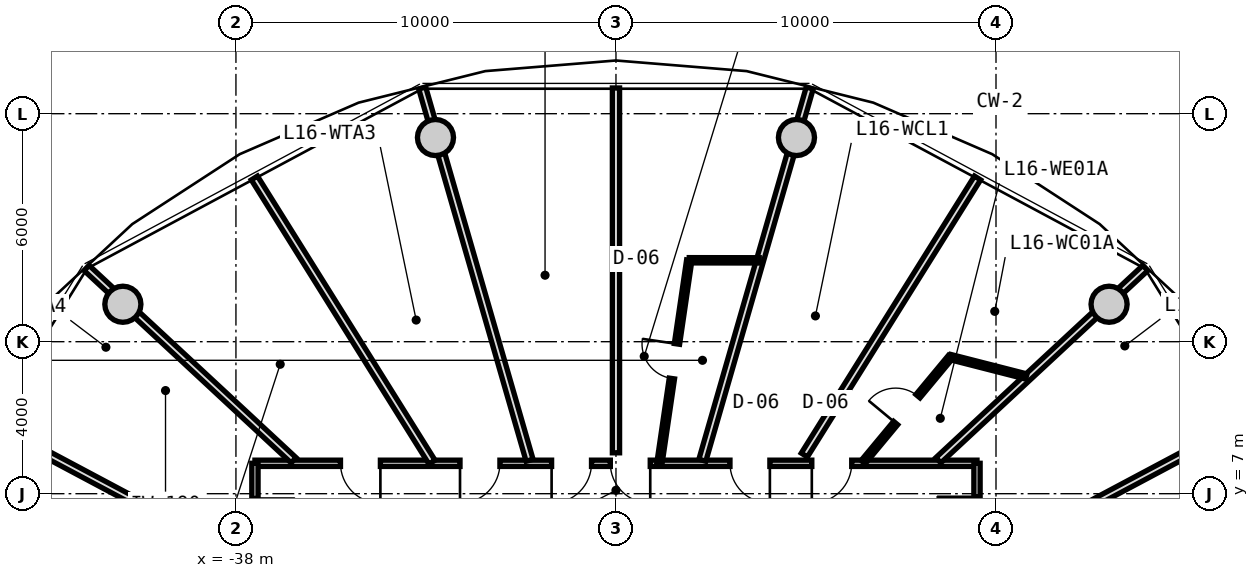
"""IFC4 building model, lengths in metres.
Left out: names, types, materials, properties, quantities, classifications, styles, units other than length and angle.
Written with IfcOpenShell. Run it as: python <this file> out.ifc"""

import sys

from ifc_helpers import new_model, si_unit, direction, frame, frame_2d, origin, origin_2d, place, context, subcontext, project, spatial, rectangle, circle, extrude, source, transform, mapped, element, fill, save


model = new_model("IFC4")
c1 = context("Model", 3, precision=1e-05, world=origin(), true_north=direction((0.0, 1.0)))
c2 = subcontext(c1, "Body", "Model", "MODEL_VIEW")
j1 = project(units=[si_unit("LENGTHUNIT", "METRE"), si_unit("PLANEANGLEUNIT", "RADIAN")], contexts=[c1])
p1 = place(None, origin())
s1 = spatial("IfcSite", under=j1, at=p1, CompositionType="ELEMENT")
p2 = place(p1, origin())
s2 = spatial("IfcBuilding", under=s1, at=p2, CompositionType="ELEMENT")
p3 = place(p2, frame((0.0, 0.0, 55.15)))
s3 = spatial("IfcBuildingStorey", under=s2, at=p3, CompositionType="ELEMENT", Elevation=55.15)
m1 = source(origin(), c2, "Body", "SweptSolid", [
    extrude(circle(Radius=0.475, at=origin_2d()), origin(), (0.0, 0.0, 1.0), 3.05),
])
for number, where, z_axis, x_axis in (
    (1, (-15.025, 11.985, 0.0), (0.0, 0.0, 1.0), (1.0, 0.0, 0.0)),
    (2, (-23.251, 16.373, 0.0), (0.0, 0.0, 1.0), (1.0, 0.0, 0.0)),
    (3, (-32.749, 16.373, 0.0), (0.0, 0.0, 1.0), (1.0, 0.0, 0.0)),
    (4, (-40.975, 11.985, 0.0), (0.0, 0.0, 1.0), (1.0, 0.0, 0.0)),
):
    element("IfcColumn", number, at=place(p3, frame(where, z_axis=z_axis, x_axis=x_axis)), inside=s3, PredefinedType="COLUMN", context=c2, shape_type="MappedRepresentation", body=[
        mapped(m1, transform((0.0, 0.0, 0.0), x_axis=(1.0, 0.0, 0.0), y_axis=(0.0, 1.0, 0.0), z_axis=(0.0, 0.0, 1.0), scale=1.0)),
    ])
m2 = source(origin(), c2, "Body", "SweptSolid", [
    extrude(rectangle(XDim=19.0, YDim=0.165, at=frame_2d((9.5, 0.0))), origin(), (0.0, 0.0, 1.0), 2.775),
])
p4 = place(p3, frame((-37.5, 7.8, 0.0), z_axis=(0.0, 0.0, 1.0), x_axis=(1.0, 0.0, 0.0)))
e5 = element("IfcWall", 5, at=p4, inside=s3, PredefinedType="PARTITIONING", context=c2, shape_type="MappedRepresentation", body=[
    mapped(m2, transform((0.0, 0.0, 0.0), x_axis=(1.0, 0.0, 0.0), y_axis=(0.0, 1.0, 0.0), z_axis=(0.0, 0.0, 1.0), scale=1.0)),
])
p5 = place(p4, frame((14.653, 0.0, 0.0)))
e6 = element("IfcOpeningElement", 6, at=p5, cuts=e5, PredefinedType="OPENING", context=c2, shape_type="SweptSolid", body=[
    extrude(rectangle(XDim=1.05, YDim=2.15, at=frame_2d((0.525, 1.075))), frame((0.0, 0.093, 0.0), z_axis=(0.0, -1.0, 0.0), x_axis=(1.0, 0.0, 0.0)), (0.0, 0.0, 1.0), 0.185),
])
p6 = place(p4, frame((12.5, 0.0, 0.0)))
e7 = element("IfcOpeningElement", 7, at=p6, cuts=e5, PredefinedType="OPENING", context=c2, shape_type="SweptSolid", body=[
    extrude(rectangle(XDim=1.05, YDim=2.15, at=frame_2d((0.525, 1.075))), frame((0.0, 0.093, 0.0), z_axis=(0.0, -1.0, 0.0), x_axis=(1.0, 0.0, 0.0)), (0.0, 0.0, 1.0), 0.185),
])
p7 = place(p4, frame((9.352, 0.0, 0.0)))
e8 = element("IfcOpeningElement", 8, at=p7, cuts=e5, PredefinedType="OPENING", context=c2, shape_type="SweptSolid", body=[
    extrude(rectangle(XDim=1.05, YDim=2.15, at=frame_2d((0.525, 1.075))), frame((0.0, 0.093, 0.0), z_axis=(0.0, -1.0, 0.0), x_axis=(1.0, 0.0, 0.0)), (0.0, 0.0, 1.0), 0.185),
])
p8 = place(p4, frame((7.806, 0.0, 0.0)))
e9 = element("IfcOpeningElement", 9, at=p8, cuts=e5, PredefinedType="OPENING", context=c2, shape_type="SweptSolid", body=[
    extrude(rectangle(XDim=1.05, YDim=2.15, at=frame_2d((0.525, 1.075))), frame((0.0, 0.093, 0.0), z_axis=(0.0, -1.0, 0.0), x_axis=(1.0, 0.0, 0.0)), (0.0, 0.0, 1.0), 0.185),
])
p9 = place(p4, frame((5.396, 0.0, 0.0)))
e10 = element("IfcOpeningElement", 10, at=p9, cuts=e5, PredefinedType="OPENING", context=c2, shape_type="SweptSolid", body=[
    extrude(rectangle(XDim=1.05, YDim=2.15, at=frame_2d((0.525, 1.075))), frame((0.0, 0.093, 0.0), z_axis=(0.0, -1.0, 0.0), x_axis=(1.0, 0.0, 0.0)), (0.0, 0.0, 1.0), 0.185),
])
p10 = place(p4, frame((2.251, 0.0, 0.0)))
e11 = element("IfcOpeningElement", 11, at=p10, cuts=e5, PredefinedType="OPENING", context=c2, shape_type="SweptSolid", body=[
    extrude(rectangle(XDim=1.05, YDim=2.15, at=frame_2d((0.525, 1.075))), frame((0.0, 0.093, 0.0), z_axis=(0.0, -1.0, 0.0), x_axis=(1.0, 0.0, 0.0)), (0.0, 0.0, 1.0), 0.185),
])
m3 = source(origin(), c2, "Body", "SweptSolid", [
    extrude(rectangle(XDim=15.6, YDim=0.165, at=frame_2d((7.8, 0.0))), origin(), (0.0, 0.0, 1.0), 2.775),
])
p11 = place(p3, frame((-37.5, -7.8, 0.0), z_axis=(0.0, 0.0, 1.0), x_axis=(0.0, 1.0, 0.0)))
e12 = element("IfcWall", 12, at=p11, inside=s3, PredefinedType="PARTITIONING", context=c2, shape_type="MappedRepresentation", body=[
    mapped(m3, transform((0.0, 0.0, 0.0), x_axis=(1.0, 0.0, 0.0), y_axis=(0.0, 1.0, 0.0), z_axis=(0.0, 0.0, 1.0), scale=1.0)),
])
p12 = place(p11, frame((13.623, 0.0, 0.0)))
e13 = element("IfcOpeningElement", 13, at=p12, cuts=e12, PredefinedType="OPENING", context=c2, shape_type="SweptSolid", body=[
    extrude(rectangle(XDim=1.05, YDim=2.15, at=frame_2d((0.525, 1.075))), frame((0.0, 0.093, 0.0), z_axis=(0.0, -1.0, 0.0), x_axis=(1.0, 0.0, 0.0)), (0.0, 0.0, 1.0), 0.185),
])
p13 = place(p11, frame((11.018, 0.0, 0.0)))
e14 = element("IfcOpeningElement", 14, at=p13, cuts=e12, PredefinedType="OPENING", context=c2, shape_type="SweptSolid", body=[
    extrude(rectangle(XDim=1.05, YDim=2.15, at=frame_2d((0.525, 1.075))), frame((0.0, 0.093, 0.0), z_axis=(0.0, -1.0, 0.0), x_axis=(1.0, 0.0, 0.0)), (0.0, 0.0, 1.0), 0.185),
])
p14 = place(p11, frame((8.467, 0.0, 0.0)))
e15 = element("IfcOpeningElement", 15, at=p14, cuts=e12, PredefinedType="OPENING", context=c2, shape_type="SweptSolid", body=[
    extrude(rectangle(XDim=1.05, YDim=2.15, at=frame_2d((0.525, 1.075))), frame((0.0, 0.093, 0.0), z_axis=(0.0, -1.0, 0.0), x_axis=(1.0, 0.0, 0.0)), (0.0, 0.0, 1.0), 0.185),
])
p15 = place(p11, frame((6.035, 0.0, 0.0)))
e16 = element("IfcOpeningElement", 16, at=p15, cuts=e12, PredefinedType="OPENING", context=c2, shape_type="SweptSolid", body=[
    extrude(rectangle(XDim=1.05, YDim=2.15, at=frame_2d((0.525, 1.075))), frame((0.0, 0.093, 0.0), z_axis=(0.0, -1.0, 0.0), x_axis=(1.0, 0.0, 0.0)), (0.0, 0.0, 1.0), 0.185),
])
p16 = place(p11, frame((3.489, 0.0, 0.0)))
e17 = element("IfcOpeningElement", 17, at=p16, cuts=e12, PredefinedType="OPENING", context=c2, shape_type="SweptSolid", body=[
    extrude(rectangle(XDim=1.05, YDim=2.15, at=frame_2d((0.525, 1.075))), frame((0.0, 0.093, 0.0), z_axis=(0.0, -1.0, 0.0), x_axis=(1.0, 0.0, 0.0)), (0.0, 0.0, 1.0), 0.185),
])
p17 = place(p11, frame((0.882, 0.0, 0.0)))
e18 = element("IfcOpeningElement", 18, at=p17, cuts=e12, PredefinedType="OPENING", context=c2, shape_type="SweptSolid", body=[
    extrude(rectangle(XDim=1.05, YDim=2.15, at=frame_2d((0.525, 1.075))), frame((0.0, 0.093, 0.0), z_axis=(0.0, -1.0, 0.0), x_axis=(1.0, 0.0, 0.0)), (0.0, 0.0, 1.0), 0.185),
])
p18 = place(p3, frame((-18.5, 7.8, 0.0), z_axis=(0.0, 0.0, 1.0), x_axis=(0.0, -1.0, 0.0)))
e19 = element("IfcWall", 19, at=p18, inside=s3, PredefinedType="PARTITIONING", context=c2, shape_type="MappedRepresentation", body=[
    mapped(m3, transform((0.0, 0.0, 0.0), x_axis=(1.0, 0.0, 0.0), y_axis=(0.0, 1.0, 0.0), z_axis=(0.0, 0.0, 1.0), scale=1.0)),
])
p19 = place(p18, frame((12.141, 0.0, 0.0)))
e20 = element("IfcOpeningElement", 20, at=p19, cuts=e19, PredefinedType="OPENING", context=c2, shape_type="SweptSolid", body=[
    extrude(rectangle(XDim=1.25, YDim=2.2, at=frame_2d((0.625, 1.1))), frame((0.0, 0.093, 0.0), z_axis=(0.0, -1.0, 0.0), x_axis=(1.0, 0.0, 0.0)), (0.0, 0.0, 1.0), 0.185),
])
p20 = place(p18, frame((7.175, 0.0, 0.0)))
e21 = element("IfcOpeningElement", 21, at=p20, cuts=e19, PredefinedType="OPENING", context=c2, shape_type="SweptSolid", body=[
    extrude(rectangle(XDim=1.25, YDim=2.2, at=frame_2d((0.625, 1.1))), frame((0.0, 0.093, 0.0), z_axis=(0.0, -1.0, 0.0), x_axis=(1.0, 0.0, 0.0)), (0.0, 0.0, 1.0), 0.185),
])
p21 = place(p18, frame((2.826, 0.0, 0.0)))
e22 = element("IfcOpeningElement", 22, at=p21, cuts=e19, PredefinedType="OPENING", context=c2, shape_type="SweptSolid", body=[
    extrude(rectangle(XDim=1.05, YDim=2.15, at=frame_2d((0.525, 1.075))), frame((0.0, 0.093, 0.0), z_axis=(0.0, -1.0, 0.0), x_axis=(1.0, 0.0, 0.0)), (0.0, 0.0, 1.0), 0.185),
])
p22 = place(p18, frame((0.881, 0.0, 0.0)))
e23 = element("IfcOpeningElement", 23, at=p22, cuts=e19, PredefinedType="OPENING", context=c2, shape_type="SweptSolid", body=[
    extrude(rectangle(XDim=1.05, YDim=2.15, at=frame_2d((0.525, 1.075))), frame((0.0, 0.093, 0.0), z_axis=(0.0, -1.0, 0.0), x_axis=(1.0, 0.0, 0.0)), (0.0, 0.0, 1.0), 0.185),
])
m4 = source(origin(), c2, "Body", "SweptSolid", [
    extrude(rectangle(XDim=7.435, YDim=0.19, at=frame_2d((3.717, 0.0))), origin(), (0.0, 0.0, 1.0), 2.225),
])
p23 = place(p3, frame((-36.483, 7.88, 0.0), z_axis=(0.0, 0.0, 1.0), x_axis=(-0.732651956848, 0.680603489652, 0.0)))
e24 = element("IfcWall", 24, at=p23, inside=s3, PredefinedType="PARTITIONING", context=c2, shape_type="MappedRepresentation", body=[
    mapped(m4, transform((0.0, 0.0, 0.0), x_axis=(1.0, 0.0, 0.0), y_axis=(0.0, 1.0, 0.0), z_axis=(0.0, 0.0, 1.0), scale=1.0)),
])
m5 = source(origin(), c2, "Body", "SweptSolid", [
    extrude(rectangle(XDim=7.873, YDim=0.19, at=frame_2d((3.937, 0.0))), origin(), (0.0, 0.0, 1.0), 2.775),
])
p24 = place(p3, frame((-37.53, 5.138, 0.0), z_axis=(0.0, 0.0, 1.0), x_axis=(-0.882666052726, 0.470000680175, 0.0)))
e25 = element("IfcWall", 25, at=p24, inside=s3, PredefinedType="PARTITIONING", context=c2, shape_type="MappedRepresentation", body=[
    mapped(m5, transform((0.0, 0.0, 0.0), x_axis=(1.0, 0.0, 0.0), y_axis=(0.0, 1.0, 0.0), z_axis=(0.0, 0.0, 1.0), scale=1.0)),
])
p25 = place(p3, frame((-19.517, 7.88, 0.0), z_axis=(0.0, 0.0, 1.0), x_axis=(0.732651956848, 0.680603489652, 0.0)))
e26 = element("IfcWall", 26, at=p25, inside=s3, PredefinedType="PARTITIONING", context=c2, shape_type="MappedRepresentation", body=[
    mapped(m4, transform((0.0, 0.0, 0.0), x_axis=(1.0, 0.0, 0.0), y_axis=(0.0, 1.0, 0.0), z_axis=(0.0, 0.0, 1.0), scale=1.0)),
])
m6 = source(origin(), c2, "Body", "SweptSolid", [
    extrude(rectangle(XDim=7.677, YDim=0.19, at=frame_2d((3.838, 0.0))), origin(), (0.0, 0.0, 1.0), 2.775),
])
p26 = place(p3, frame((-18.297, 5.231, 0.0), z_axis=(0.0, 0.0, 1.0), x_axis=(0.882725057546, 0.469889851753, 0.0)))
e27 = element("IfcWall", 27, at=p26, inside=s3, PredefinedType="PARTITIONING", context=c2, shape_type="MappedRepresentation", body=[
    mapped(m6, transform((0.0, 0.0, 0.0), x_axis=(1.0, 0.0, 0.0), y_axis=(0.0, 1.0, 0.0), z_axis=(0.0, 0.0, 1.0), scale=1.0)),
])
m7 = source(origin(), c2, "Body", "SweptSolid", [
    extrude(rectangle(XDim=10.196, YDim=0.19, at=frame_2d((5.098, 0.0))), origin(), (0.0, 0.0, 1.0), 2.225),
])
p27 = place(p3, frame((-25.727, 7.88, 0.0), z_axis=(0.0, 0.0, 1.0), x_axis=(0.277136420347, 0.960830580549, 0.0)))
e28 = element("IfcWall", 28, at=p27, inside=s3, PredefinedType="PARTITIONING", context=c2, shape_type="MappedRepresentation", body=[
    mapped(m7, transform((0.0, 0.0, 0.0), x_axis=(1.0, 0.0, 0.0), y_axis=(0.0, 1.0, 0.0), z_axis=(0.0, 0.0, 1.0), scale=1.0)),
])
m8 = source(origin(), c2, "Body", "SweptSolid", [
    extrude(rectangle(XDim=8.598, YDim=0.19, at=frame_2d((4.299, 0.0))), origin(), (0.0, 0.0, 1.0), 2.775),
])
p28 = place(p3, frame((-23.043, 8.017, 0.0), z_axis=(0.0, 0.0, 1.0), x_axis=(0.530039776395, 0.847972779893, 0.0)))
e29 = element("IfcWall", 29, at=p28, inside=s3, PredefinedType="PARTITIONING", context=c2, shape_type="MappedRepresentation", body=[
    mapped(m8, transform((0.0, 0.0, 0.0), x_axis=(1.0, 0.0, 0.0), y_axis=(0.0, 1.0, 0.0), z_axis=(0.0, 0.0, 1.0), scale=1.0)),
])
m9 = source(origin(), c2, "Body", "SweptSolid", [
    extrude(rectangle(XDim=3.594, YDim=0.14, at=frame_2d((1.797, 0.0))), origin(), (0.0, 0.0, 1.0), 2.775),
])
p29 = place(p3, frame((-21.496, 7.83, 0.0), z_axis=(0.0, 0.0, 1.0), x_axis=(0.639001147083, 0.769205781326, 0.0)))
e30 = element("IfcWall", 30, at=p29, inside=s3, PredefinedType="PARTITIONING", context=c2, shape_type="MappedRepresentation", body=[
    mapped(m9, transform((0.0, 0.0, 0.0), x_axis=(1.0, 0.0, 0.0), y_axis=(0.0, 1.0, 0.0), z_axis=(0.0, 0.0, 1.0), scale=1.0)),
])
p30 = place(p29, frame((1.337, 0.0, 0.0)))
e31 = element("IfcOpeningElement", 31, at=p30, cuts=e30, PredefinedType="OPENING", context=c2, shape_type="SweptSolid", body=[
    extrude(rectangle(XDim=0.92, YDim=2.1, at=frame_2d((0.46, 1.05))), frame((0.0, 0.08, 0.0), z_axis=(0.0, -1.0, 0.0), x_axis=(1.0, 0.0, 0.0)), (0.0, 0.0, 1.0), 0.16),
])
m10 = source(origin(), c2, "Body", "SweptSolid", [
    extrude(rectangle(XDim=2.062, YDim=0.14, at=frame_2d((1.031, 0.0))), origin(), (0.0, 0.0, 1.0), 2.415),
])
p31 = place(p3, frame((-19.199, 10.595, 0.0), z_axis=(0.0, 0.0, 1.0), x_axis=(0.968776253543, -0.247936626121, 0.0)))
e32 = element("IfcWall", 32, at=p31, inside=s3, PredefinedType="PARTITIONING", context=c2, shape_type="MappedRepresentation", body=[
    mapped(m10, transform((0.0, 0.0, 0.0), x_axis=(1.0, 0.0, 0.0), y_axis=(0.0, 1.0, 0.0), z_axis=(0.0, 0.0, 1.0), scale=1.0)),
])
p32 = place(p3, frame((-30.273, 7.88, 0.0), z_axis=(0.0, 0.0, 1.0), x_axis=(-0.277136420347, 0.960830580549, 0.0)))
e33 = element("IfcWall", 33, at=p32, inside=s3, PredefinedType="PARTITIONING", context=c2, shape_type="MappedRepresentation", body=[
    mapped(m7, transform((0.0, 0.0, 0.0), x_axis=(1.0, 0.0, 0.0), y_axis=(0.0, 1.0, 0.0), z_axis=(0.0, 0.0, 1.0), scale=1.0)),
])
m11 = source(origin(), c2, "Body", "SweptSolid", [
    extrude(rectangle(XDim=9.601, YDim=0.19, at=frame_2d((4.8, 0.0))), origin(), (0.0, 0.0, 1.0), 2.775),
])
p33 = place(p3, frame((-28.0, 8.076, 0.0), z_axis=(0.0, 0.0, 1.0), x_axis=(0.0, 1.0, 0.0)))
e34 = element("IfcWall", 34, at=p33, inside=s3, PredefinedType="PARTITIONING", context=c2, shape_type="MappedRepresentation", body=[
    mapped(m11, transform((0.0, 0.0, 0.0), x_axis=(1.0, 0.0, 0.0), y_axis=(0.0, 1.0, 0.0), z_axis=(0.0, 0.0, 1.0), scale=1.0)),
])
m12 = source(origin(), c2, "Body", "SweptSolid", [
    extrude(rectangle(XDim=5.37, YDim=0.14, at=frame_2d((2.685, 0.0))), origin(), (0.0, 0.0, 1.0), 2.775),
])
p34 = place(p3, frame((-26.851, 7.83, 0.0), z_axis=(0.0, 0.0, 1.0), x_axis=(0.145131397853, 0.989412389935, 0.0)))
e35 = element("IfcWall", 35, at=p34, inside=s3, PredefinedType="PARTITIONING", context=c2, shape_type="MappedRepresentation", body=[
    mapped(m12, transform((0.0, 0.0, 0.0), x_axis=(1.0, 0.0, 0.0), y_axis=(0.0, 1.0, 0.0), z_axis=(0.0, 0.0, 1.0), scale=1.0)),
])
p35 = place(p34, frame((2.225, 0.0, 0.0)))
e36 = element("IfcOpeningElement", 36, at=p35, cuts=e35, PredefinedType="OPENING", context=c2, shape_type="SweptSolid", body=[
    extrude(rectangle(XDim=0.92, YDim=2.1, at=frame_2d((0.46, 1.05))), frame((0.0, 0.08, 0.0), z_axis=(0.0, -1.0, 0.0), x_axis=(1.0, 0.0, 0.0)), (0.0, 0.0, 1.0), 0.16),
])
m13 = source(origin(), c2, "Body", "SweptSolid", [
    extrude(rectangle(XDim=1.843, YDim=0.14, at=frame_2d((0.921, 0.0))), origin(), (0.0, 0.0, 1.0), 2.775),
])
p36 = place(p3, frame((-26.072, 13.143, 0.0), z_axis=(0.0, 0.0, 1.0), x_axis=(0.999998937801, -0.001457531246, 0.0)))
e37 = element("IfcWall", 37, at=p36, inside=s3, PredefinedType="PARTITIONING", context=c2, shape_type="MappedRepresentation", body=[
    mapped(m13, transform((0.0, 0.0, 0.0), x_axis=(1.0, 0.0, 0.0), y_axis=(0.0, 1.0, 0.0), z_axis=(0.0, 0.0, 1.0), scale=1.0)),
])
m14 = source(origin(), c2, "Body", "SweptSolid", [
    extrude(rectangle(XDim=8.818, YDim=0.19, at=frame_2d((4.409, 0.0))), origin(), (0.0, 0.0, 1.0), 2.775),
])
p37 = place(p3, frame((-32.841, 7.83, 0.0), z_axis=(0.0, 0.0, 1.0), x_axis=(-0.529931746109, 0.848040296487, 0.0)))
e38 = element("IfcWall", 38, at=p37, inside=s3, PredefinedType="PARTITIONING", context=c2, shape_type="MappedRepresentation", body=[
    mapped(m14, transform((0.0, 0.0, 0.0), x_axis=(1.0, 0.0, 0.0), y_axis=(0.0, 1.0, 0.0), z_axis=(0.0, 0.0, 1.0), scale=1.0)),
])
m15 = source(origin(), c2, "Body", "SweptSolid", [
    extrude(rectangle(XDim=1.05, YDim=2.15, at=frame_2d((0.525, 1.075))), frame((0.0, 0.025, 0.0), z_axis=(0.0, -1.0, 0.0), x_axis=(1.0, 0.0, 0.0)), (0.0, 0.0, 1.0), 0.05),
])
p38 = place(p22, frame((1.05, 0.0, 0.0), z_axis=(0.0, 0.0, 1.0), x_axis=(-1.0, 0.0, 0.0)))
e39 = element("IfcDoor", 39, at=p38, inside=s3, OperationType="SINGLE_SWING_RIGHT", PredefinedType="DOOR", context=c2, shape_type="MappedRepresentation", body=[
    mapped(m15, transform((0.0, 0.0, 0.0), x_axis=(1.0, 0.0, 0.0), y_axis=(0.0, 1.0, 0.0), z_axis=(0.0, 0.0, 1.0), scale=1.0)),
])
fill(e23, e39)
p39 = place(p5, frame((1.05, 0.0, 0.0), z_axis=(0.0, 0.0, 1.0), x_axis=(-1.0, 0.0, 0.0)))
e40 = element("IfcDoor", 40, at=p39, inside=s3, OperationType="SINGLE_SWING_RIGHT", PredefinedType="DOOR", context=c2, shape_type="MappedRepresentation", body=[
    mapped(m15, transform((0.0, 0.0, 0.0), x_axis=(1.0, 0.0, 0.0), y_axis=(0.0, 1.0, 0.0), z_axis=(0.0, 0.0, 1.0), scale=1.0)),
])
fill(e6, e40)
m16 = source(origin(), c2, "Body", "SweptSolid", [
    extrude(rectangle(XDim=0.92, YDim=2.1, at=frame_2d((0.46, 1.05))), frame((0.0, 0.025, 0.0), z_axis=(0.0, -1.0, 0.0), x_axis=(1.0, 0.0, 0.0)), (0.0, 0.0, 1.0), 0.05),
])
p40 = place(p30, origin())
e41 = element("IfcDoor", 41, at=p40, inside=s3, OperationType="SINGLE_SWING_LEFT", PredefinedType="DOOR", context=c2, shape_type="MappedRepresentation", body=[
    mapped(m16, transform((0.0, 0.0, 0.0), x_axis=(1.0, 0.0, 0.0), y_axis=(0.0, 1.0, 0.0), z_axis=(0.0, 0.0, 1.0), scale=1.0)),
])
fill(e31, e41)
p41 = place(p6, frame((1.05, 0.0, 0.0), z_axis=(0.0, 0.0, 1.0), x_axis=(-1.0, 0.0, 0.0)))
e42 = element("IfcDoor", 42, at=p41, inside=s3, OperationType="SINGLE_SWING_LEFT", PredefinedType="DOOR", context=c2, shape_type="MappedRepresentation", body=[
    mapped(m15, transform((0.0, 0.0, 0.0), x_axis=(1.0, 0.0, 0.0), y_axis=(0.0, 1.0, 0.0), z_axis=(0.0, 0.0, 1.0), scale=1.0)),
])
fill(e7, e42)
p42 = place(p7, frame((1.05, 0.0, 0.0), z_axis=(0.0, 0.0, 1.0), x_axis=(-1.0, 0.0, 0.0)))
e43 = element("IfcDoor", 43, at=p42, inside=s3, OperationType="SINGLE_SWING_LEFT", PredefinedType="DOOR", context=c2, shape_type="MappedRepresentation", body=[
    mapped(m15, transform((0.0, 0.0, 0.0), x_axis=(1.0, 0.0, 0.0), y_axis=(0.0, 1.0, 0.0), z_axis=(0.0, 0.0, 1.0), scale=1.0)),
])
fill(e8, e43)
p43 = place(p35, origin())
e44 = element("IfcDoor", 44, at=p43, inside=s3, OperationType="SINGLE_SWING_RIGHT", PredefinedType="DOOR", context=c2, shape_type="MappedRepresentation", body=[
    mapped(m16, transform((0.0, 0.0, 0.0), x_axis=(1.0, 0.0, 0.0), y_axis=(0.0, 1.0, 0.0), z_axis=(0.0, 0.0, 1.0), scale=1.0)),
])
fill(e36, e44)
p44 = place(p8, frame((1.05, 0.0, 0.0), z_axis=(0.0, 0.0, 1.0), x_axis=(-1.0, 0.0, 0.0)))
e45 = element("IfcDoor", 45, at=p44, inside=s3, OperationType="SINGLE_SWING_RIGHT", PredefinedType="DOOR", context=c2, shape_type="MappedRepresentation", body=[
    mapped(m15, transform((0.0, 0.0, 0.0), x_axis=(1.0, 0.0, 0.0), y_axis=(0.0, 1.0, 0.0), z_axis=(0.0, 0.0, 1.0), scale=1.0)),
])
fill(e9, e45)
p45 = place(p9, frame((1.05, 0.0, 0.0), z_axis=(0.0, 0.0, 1.0), x_axis=(-1.0, 0.0, 0.0)))
e46 = element("IfcDoor", 46, at=p45, inside=s3, OperationType="SINGLE_SWING_RIGHT", PredefinedType="DOOR", context=c2, shape_type="MappedRepresentation", body=[
    mapped(m15, transform((0.0, 0.0, 0.0), x_axis=(1.0, 0.0, 0.0), y_axis=(0.0, 1.0, 0.0), z_axis=(0.0, 0.0, 1.0), scale=1.0)),
])
fill(e10, e46)
p46 = place(p10, frame((1.05, 0.0, 0.0), z_axis=(0.0, 0.0, 1.0), x_axis=(-1.0, 0.0, 0.0)))
e47 = element("IfcDoor", 47, at=p46, inside=s3, OperationType="SINGLE_SWING_LEFT", PredefinedType="DOOR", context=c2, shape_type="MappedRepresentation", body=[
    mapped(m15, transform((0.0, 0.0, 0.0), x_axis=(1.0, 0.0, 0.0), y_axis=(0.0, 1.0, 0.0), z_axis=(0.0, 0.0, 1.0), scale=1.0)),
])
fill(e11, e47)
save(model, sys.argv[1])
